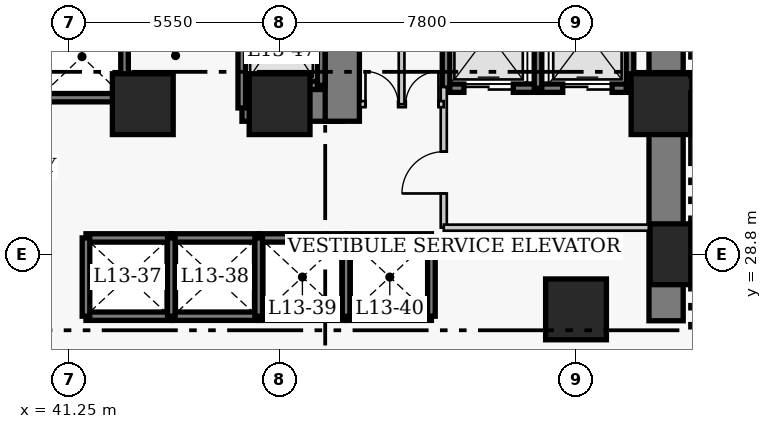
"""IFC4 building model, lengths in metres.
Left out: names, types, materials, properties, quantities, classifications, styles, units other than length and angle.
Written with IfcOpenShell. Run it as: python <this file> out.ifc"""

import sys

from ifc_helpers import new_model, si_unit, direction, frame, frame_2d, origin, origin_2d, place, context, subcontext, project, spatial, rectangle, extrude, element, fill, save


model = new_model("IFC4")
c1 = context("Model", 3, precision=1e-05, world=origin(), true_north=direction((0.0, 1.0)))
c2 = subcontext(c1, "Body", "Model", "MODEL_VIEW")
j1 = project(units=[si_unit("LENGTHUNIT", "METRE"), si_unit("PLANEANGLEUNIT", "RADIAN")], contexts=[c1])
p1 = place(None, origin())
s1 = spatial("IfcSite", under=j1, at=p1, CompositionType="ELEMENT")
p2 = place(p1, origin())
s2 = spatial("IfcBuilding", under=s1, at=p2, CompositionType="ELEMENT")
p3 = place(p2, frame((0.0, 0.0, 56.4)))
s3 = spatial("IfcBuildingStorey", under=s2, at=p3, CompositionType="ELEMENT", Elevation=56.4)
p4 = place(p3, frame((56.97, 27.05, 0.0), z_axis=(0.0, 0.0, 1.0), x_axis=(0.0, 1.0, 0.0)))
e1 = element("IfcWall", 1, at=p4, inside=s3, PredefinedType="SHEAR", context=c2, shape_type="SweptSolid", body=[
    extrude(rectangle(XDim=13.72, YDim=0.9, at=frame_2d((6.86, 0.0))), origin(), (0.0, 0.0, 1.0), 3.8),
])
p5 = place(p3, frame((45.81, 32.75, 0.0), z_axis=(0.0, 0.0, 1.0), x_axis=(1.0, 0.0, 0.0)))
e2 = element("IfcWall", 2, at=p5, inside=s3, PredefinedType="SHEAR", context=c2, shape_type="SweptSolid", body=[
    extrude(rectangle(XDim=2.64, YDim=0.9, at=frame_2d((1.32, 0.0))), origin(), (0.0, 0.0, 1.0), 3.8),
])
p6 = place(p3, frame((48.45, 32.3, 0.0), z_axis=(0.0, 0.0, 1.0), x_axis=(0.0, 1.0, 0.0)))
e3 = element("IfcWall", 3, at=p6, inside=s3, PredefinedType="SHEAR", context=c2, shape_type="SweptSolid", body=[
    extrude(rectangle(XDim=8.02, YDim=0.9, at=frame_2d((4.01, 0.0))), origin(), (0.0, 0.0, 1.0), 3.8),
])
p7 = place(p6, frame((5.9, 0.0, 0.0)))
e4 = element("IfcOpeningElement", 4, at=p7, cuts=e3, PredefinedType="OPENING", context=c2, shape_type="SweptSolid", body=[
    extrude(rectangle(XDim=1.1, YDim=2.15, at=frame_2d((0.55, 1.075))), frame((0.0, 0.46, 0.0), z_axis=(0.0, -1.0, 0.0), x_axis=(1.0, 0.0, 0.0)), (0.0, 0.0, 1.0), 0.92),
])
for number, where, z_axis, x_axis in (
    (5, (57.35, 28.8, 0.0), (0.0, 0.0, 1.0), (1.0, 0.0, 0.0)),
    (6, (43.2, 32.75, 0.0), (0.0, 0.0, 1.0), (1.0, 0.0, 0.0)),
    (7, (46.8, 32.75, 0.0), (0.0, 0.0, 1.0), (1.0, 0.0, 0.0)),
    (8, (54.6, 27.35, 0.0), (0.0, 0.0, 1.0), (1.0, 0.0, 0.0)),
    (9, (56.85, 32.75, 0.0), (0.0, 0.0, 1.0), (1.0, 0.0, 0.0)),
):
    element("IfcColumn", number, at=place(p3, frame(where, z_axis=z_axis, x_axis=x_axis)), inside=s3, PredefinedType="COLUMN", context=c2, shape_type="SweptSolid", body=[
        extrude(rectangle(XDim=1.6, YDim=1.6, at=origin_2d()), origin(), (0.0, 0.0, 1.0), 3.8),
    ])
for number, where, z_axis, x_axis in (
    (10, (41.705, 29.23, 0.0), (0.0, 0.0, 1.0), (1.0, 0.0, 0.0)),
    (11, (41.705, 27.17, 0.0), (0.0, 0.0, 1.0), (1.0, 0.0, 0.0)),
):
    element("IfcWall", number, at=place(p3, frame(where, z_axis=z_axis, x_axis=x_axis)), inside=s3, PredefinedType="SHEAR", context=c2, shape_type="SweptSolid", body=[
        extrude(rectangle(XDim=2.245, YDim=0.22, at=frame_2d((1.123, 0.0))), origin(), (0.0, 0.0, 1.0), 3.8),
    ])
p8 = place(p3, frame((41.705, 27.17, 0.0), z_axis=(0.0, 0.0, 1.0), x_axis=(0.0, 1.0, 0.0)))
e12 = element("IfcWall", 12, at=p8, inside=s3, PredefinedType="SHEAR", context=c2, shape_type="SweptSolid", body=[
    extrude(rectangle(XDim=2.06, YDim=0.2, at=frame_2d((1.03, 0.0))), origin(), (0.0, 0.0, 1.0), 3.8),
])
for number, where, z_axis, x_axis in (
    (13, (43.95, 29.23, 0.0), (0.0, 0.0, 1.0), (1.0, 0.0, 0.0)),
    (14, (43.95, 27.17, 0.0), (0.0, 0.0, 1.0), (1.0, 0.0, 0.0)),
):
    element("IfcWall", number, at=place(p3, frame(where, z_axis=z_axis, x_axis=x_axis)), inside=s3, PredefinedType="SHEAR", context=c2, shape_type="SweptSolid", body=[
        extrude(rectangle(XDim=2.3, YDim=0.22, at=frame_2d((1.15, 0.0))), origin(), (0.0, 0.0, 1.0), 3.8),
    ])
p9 = place(p3, frame((43.95, 27.17, 0.0), z_axis=(0.0, 0.0, 1.0), x_axis=(0.0, 1.0, 0.0)))
e15 = element("IfcWall", 15, at=p9, inside=s3, PredefinedType="SHEAR", context=c2, shape_type="SweptSolid", body=[
    extrude(rectangle(XDim=2.06, YDim=0.2, at=frame_2d((1.03, 0.0))), origin(), (0.0, 0.0, 1.0), 3.8),
])
for number, where, z_axis, x_axis in (
    (16, (46.25, 29.23, 0.0), (0.0, 0.0, 1.0), (1.0, 0.0, 0.0)),
    (17, (46.25, 27.17, 0.0), (0.0, 0.0, 1.0), (1.0, 0.0, 0.0)),
):
    element("IfcWall", number, at=place(p3, frame(where, z_axis=z_axis, x_axis=x_axis)), inside=s3, PredefinedType="SHEAR", context=c2, shape_type="SweptSolid", body=[
        extrude(rectangle(XDim=2.3, YDim=0.22, at=frame_2d((1.15, 0.0))), origin(), (0.0, 0.0, 1.0), 3.8),
    ])
p10 = place(p3, frame((46.25, 27.17, 0.0), z_axis=(0.0, 0.0, 1.0), x_axis=(0.0, 1.0, 0.0)))
e18 = element("IfcWall", 18, at=p10, inside=s3, PredefinedType="SHEAR", context=c2, shape_type="SweptSolid", body=[
    extrude(rectangle(XDim=2.06, YDim=0.2, at=frame_2d((1.03, 0.0))), origin(), (0.0, 0.0, 1.0), 3.8),
])
for number, where, z_axis, x_axis in (
    (19, (48.55, 29.23, 0.0), (0.0, 0.0, 1.0), (1.0, 0.0, 0.0)),
    (20, (48.55, 27.17, 0.0), (0.0, 0.0, 1.0), (1.0, 0.0, 0.0)),
):
    element("IfcWall", number, at=place(p3, frame(where, z_axis=z_axis, x_axis=x_axis)), inside=s3, PredefinedType="SHEAR", context=c2, shape_type="SweptSolid", body=[
        extrude(rectangle(XDim=2.245, YDim=0.22, at=frame_2d((1.123, 0.0))), origin(), (0.0, 0.0, 1.0), 3.8),
    ])
for number, where, z_axis, x_axis in (
    (21, (48.55, 27.17, 0.0), (0.0, 0.0, 1.0), (0.0, 1.0, 0.0)),
    (22, (50.795, 27.17, 0.0), (0.0, 0.0, 1.0), (0.0, 1.0, 0.0)),
):
    element("IfcWall", number, at=place(p3, frame(where, z_axis=z_axis, x_axis=x_axis)), inside=s3, PredefinedType="SHEAR", context=c2, shape_type="SweptSolid", body=[
        extrude(rectangle(XDim=2.06, YDim=0.2, at=frame_2d((1.03, 0.0))), origin(), (0.0, 0.0, 1.0), 3.8),
    ])
p11 = place(p3, frame((40.4, 32.92, 0.0), z_axis=(0.0, 0.0, 1.0), x_axis=(1.0, 0.0, 0.0)))
e23 = element("IfcWall", 23, at=p11, inside=s3, PredefinedType="SHEAR", context=c2, shape_type="SweptSolid", body=[
    extrude(rectangle(XDim=2.32, YDim=0.22, at=frame_2d((1.16, 0.0))), origin(), (0.0, 0.0, 1.0), 3.8),
])
p12 = place(p3, frame((42.72, 32.92, 0.0), z_axis=(0.0, 0.0, 1.0), x_axis=(0.0, 1.0, 0.0)))
e24 = element("IfcWall", 24, at=p12, inside=s3, PredefinedType="SHEAR", context=c2, shape_type="SweptSolid", body=[
    extrude(rectangle(XDim=2.16, YDim=0.2, at=frame_2d((1.08, 0.0))), origin(), (0.0, 0.0, 1.0), 3.8),
])
p13 = place(p3, frame((51.18, 33.17, 0.0), z_axis=(0.0, 0.0, 1.0), x_axis=(1.0, 0.0, 0.0)))
e25 = element("IfcWall", 25, at=p13, inside=s3, PredefinedType="SHEAR", context=c2, shape_type="SweptSolid", body=[
    extrude(rectangle(XDim=2.42, YDim=0.22, at=frame_2d((1.21, 0.0))), origin(), (0.0, 0.0, 1.0), 3.8),
])
p14 = place(p13, frame((0.47, 0.0, 0.0)))
e26 = element("IfcOpeningElement", 26, at=p14, cuts=e25, PredefinedType="OPENING", context=c2, shape_type="SweptSolid", body=[
    extrude(rectangle(XDim=1.3, YDim=2.15, at=frame_2d((0.65, 1.075))), frame((0.0, 0.12, 0.0), z_axis=(0.0, -1.0, 0.0), x_axis=(1.0, 0.0, 0.0)), (0.0, 0.0, 1.0), 0.24),
])
p15 = place(p3, frame((51.18, 33.17, 0.0), z_axis=(0.0, 0.0, 1.0), x_axis=(0.0, 1.0, 0.0)))
e27 = element("IfcWall", 27, at=p15, inside=s3, PredefinedType="SHEAR", context=c2, shape_type="SweptSolid", body=[
    extrude(rectangle(XDim=2.86, YDim=0.2, at=frame_2d((1.43, 0.0))), origin(), (0.0, 0.0, 1.0), 3.8),
])
p16 = place(p3, frame((53.6, 33.17, 0.0), z_axis=(0.0, 0.0, 1.0), x_axis=(1.0, 0.0, 0.0)))
e28 = element("IfcWall", 28, at=p16, inside=s3, PredefinedType="SHEAR", context=c2, shape_type="SweptSolid", body=[
    extrude(rectangle(XDim=2.42, YDim=0.22, at=frame_2d((1.21, 0.0))), origin(), (0.0, 0.0, 1.0), 3.8),
])
p17 = place(p16, frame((0.65, 0.0, 0.0)))
e29 = element("IfcOpeningElement", 29, at=p17, cuts=e28, PredefinedType="OPENING", context=c2, shape_type="SweptSolid", body=[
    extrude(rectangle(XDim=1.3, YDim=2.15, at=frame_2d((0.65, 1.075))), frame((0.0, 0.12, 0.0), z_axis=(0.0, -1.0, 0.0), x_axis=(1.0, 0.0, 0.0)), (0.0, 0.0, 1.0), 0.24),
])
for number, where, z_axis, x_axis in (
    (30, (53.6, 33.17, 0.0), (0.0, 0.0, 1.0), (0.0, 1.0, 0.0)),
    (31, (56.02, 33.17, 0.0), (0.0, 0.0, 1.0), (0.0, 1.0, 0.0)),
):
    element("IfcWall", number, at=place(p3, frame(where, z_axis=z_axis, x_axis=x_axis)), inside=s3, PredefinedType="SHEAR", context=c2, shape_type="SweptSolid", body=[
        extrude(rectangle(XDim=2.86, YDim=0.2, at=frame_2d((1.43, 0.0))), origin(), (0.0, 0.0, 1.0), 3.8),
    ])
p18 = place(p3, frame((45.805, 33.245, 0.0), z_axis=(0.0, 0.0, 1.0), x_axis=(1.0, 0.0, 0.0)))
e32 = element("IfcWall", 32, at=p18, inside=s3, PredefinedType="SHEAR", context=c2, shape_type="SweptSolid", body=[
    extrude(rectangle(XDim=2.09, YDim=0.22, at=frame_2d((1.045, 0.0))), origin(), (0.0, 0.0, 1.0), 3.8),
])
p19 = place(p3, frame((45.805, 32.65, 0.0), z_axis=(0.0, 0.0, 1.0), x_axis=(0.0, 1.0, 0.0)))
e33 = element("IfcWall", 33, at=p19, inside=s3, PredefinedType="SHEAR", context=c2, shape_type="SweptSolid", body=[
    extrude(rectangle(XDim=3.505, YDim=0.2, at=frame_2d((1.752, 0.0))), origin(), (0.0, 0.0, 1.0), 3.8),
])
p20 = place(p3, frame((47.895, 33.245, 0.0), z_axis=(0.0, 0.0, 1.0), x_axis=(0.0, 1.0, 0.0)))
e34 = element("IfcWall", 34, at=p20, inside=s3, PredefinedType="SHEAR", context=c2, shape_type="SweptSolid", body=[
    extrude(rectangle(XDim=2.91, YDim=0.2, at=frame_2d((1.455, 0.0))), origin(), (0.0, 0.0, 1.0), 3.8),
])
p21 = place(p3, frame((51.12, 29.5, 0.0), z_axis=(0.0, 0.0, 1.0), x_axis=(0.0, 1.0, 0.0)))
e35 = element("IfcWall", 35, at=p21, inside=s3, PredefinedType="PARTITIONING", context=c2, shape_type="SweptSolid", body=[
    extrude(rectangle(XDim=3.7, YDim=0.16, at=frame_2d((1.85, 0.0))), origin(), (0.0, 0.0, 1.0), 3.54),
])
p22 = place(p21, frame((0.9, 0.0, 0.0)))
e36 = element("IfcOpeningElement", 36, at=p22, cuts=e35, PredefinedType="OPENING", context=c2, shape_type="SweptSolid", body=[
    extrude(rectangle(XDim=1.1, YDim=2.15, at=frame_2d((0.55, 1.075))), frame((0.0, 0.09, 0.0), z_axis=(0.0, -1.0, 0.0), x_axis=(1.0, 0.0, 0.0)), (0.0, 0.0, 1.0), 0.18),
])
p23 = place(p3, frame((51.12, 29.5, 0.0), z_axis=(0.0, 0.0, 1.0), x_axis=(1.0, 0.0, 0.0)))
e37 = element("IfcWall", 37, at=p23, inside=s3, PredefinedType="PARTITIONING", context=c2, shape_type="SweptSolid", body=[
    extrude(rectangle(XDim=5.63, YDim=0.16, at=frame_2d((2.815, 0.0))), origin(), (0.0, 0.0, 1.0), 3.54),
])
p24 = place(p3, frame((48.92, 32.75, 0.0), z_axis=(0.0, 0.0, 1.0), x_axis=(1.0, 0.0, 0.0)))
e38 = element("IfcWall", 38, at=p24, inside=s3, PredefinedType="PARTITIONING", context=c2, shape_type="SweptSolid", body=[
    extrude(rectangle(XDim=2.2, YDim=0.16, at=frame_2d((1.1, 0.0))), origin(), (0.0, 0.0, 1.0), 3.54),
])
p25 = place(p24, frame((0.14, 0.0, 0.0)))
e39 = element("IfcOpeningElement", 39, at=p25, cuts=e38, PredefinedType="OPENING", context=c2, shape_type="SweptSolid", body=[
    extrude(rectangle(XDim=0.86, YDim=2.05, at=frame_2d((0.43, 1.025))), frame((0.0, 0.09, 0.0), z_axis=(0.0, -1.0, 0.0), x_axis=(1.0, 0.0, 0.0)), (0.0, 0.0, 1.0), 0.18),
])
p26 = place(p24, frame((1.2, 0.0, 0.0)))
e40 = element("IfcOpeningElement", 40, at=p26, cuts=e38, PredefinedType="OPENING", context=c2, shape_type="SweptSolid", body=[
    extrude(rectangle(XDim=0.86, YDim=2.05, at=frame_2d((0.43, 1.025))), frame((0.0, 0.09, 0.0), z_axis=(0.0, -1.0, 0.0), x_axis=(1.0, 0.0, 0.0)), (0.0, 0.0, 1.0), 0.18),
])
p27 = place(p3, frame((50.01, 32.75, 0.0), z_axis=(0.0, 0.0, 1.0), x_axis=(0.0, 1.0, 0.0)))
e41 = element("IfcWall", 41, at=p27, inside=s3, PredefinedType="PARTITIONING", context=c2, shape_type="SweptSolid", body=[
    extrude(rectangle(XDim=3.62, YDim=0.15, at=frame_2d((1.81, 0.0))), origin(), (0.0, 0.0, 1.0), 3.54),
])
p28 = place(p14, origin())
e42 = element("IfcDoor", 42, at=p28, inside=s3, OperationType="DOUBLE_DOOR_SLIDING", PredefinedType="DOOR", context=c2, shape_type="SweptSolid", body=[
    extrude(rectangle(XDim=1.3, YDim=2.15, at=frame_2d((0.65, 1.075))), frame((0.0, 0.025, 0.0), z_axis=(0.0, -1.0, 0.0), x_axis=(1.0, 0.0, 0.0)), (0.0, 0.0, 1.0), 0.05),
])
fill(e26, e42)
p29 = place(p17, origin())
e43 = element("IfcDoor", 43, at=p29, inside=s3, OperationType="DOUBLE_DOOR_SLIDING", PredefinedType="DOOR", context=c2, shape_type="SweptSolid", body=[
    extrude(rectangle(XDim=1.3, YDim=2.15, at=frame_2d((0.65, 1.075))), frame((0.0, 0.025, 0.0), z_axis=(0.0, -1.0, 0.0), x_axis=(1.0, 0.0, 0.0)), (0.0, 0.0, 1.0), 0.05),
])
fill(e29, e43)
p30 = place(p22, origin())
e44 = element("IfcDoor", 44, at=p30, inside=s3, OperationType="SINGLE_SWING_LEFT", PredefinedType="DOOR", context=c2, shape_type="SweptSolid", body=[
    extrude(rectangle(XDim=1.1, YDim=2.15, at=frame_2d((0.55, 1.075))), frame((0.0, 0.025, 0.0), z_axis=(0.0, -1.0, 0.0), x_axis=(1.0, 0.0, 0.0)), (0.0, 0.0, 1.0), 0.05),
])
fill(e36, e44)
p31 = place(p25, origin())
e45 = element("IfcDoor", 45, at=p31, inside=s3, OperationType="SINGLE_SWING_LEFT", PredefinedType="DOOR", context=c2, shape_type="SweptSolid", body=[
    extrude(rectangle(XDim=0.86, YDim=2.05, at=frame_2d((0.43, 1.025))), frame((0.0, 0.025, 0.0), z_axis=(0.0, -1.0, 0.0), x_axis=(1.0, 0.0, 0.0)), (0.0, 0.0, 1.0), 0.05),
])
fill(e39, e45)
p32 = place(p26, origin())
e46 = element("IfcDoor", 46, at=p32, inside=s3, OperationType="SINGLE_SWING_RIGHT", PredefinedType="DOOR", context=c2, shape_type="SweptSolid", body=[
    extrude(rectangle(XDim=0.86, YDim=2.05, at=frame_2d((0.43, 1.025))), frame((0.0, 0.025, 0.0), z_axis=(0.0, -1.0, 0.0), x_axis=(1.0, 0.0, 0.0)), (0.0, 0.0, 1.0), 0.05),
])
fill(e40, e46)
save(model, sys.argv[1])
